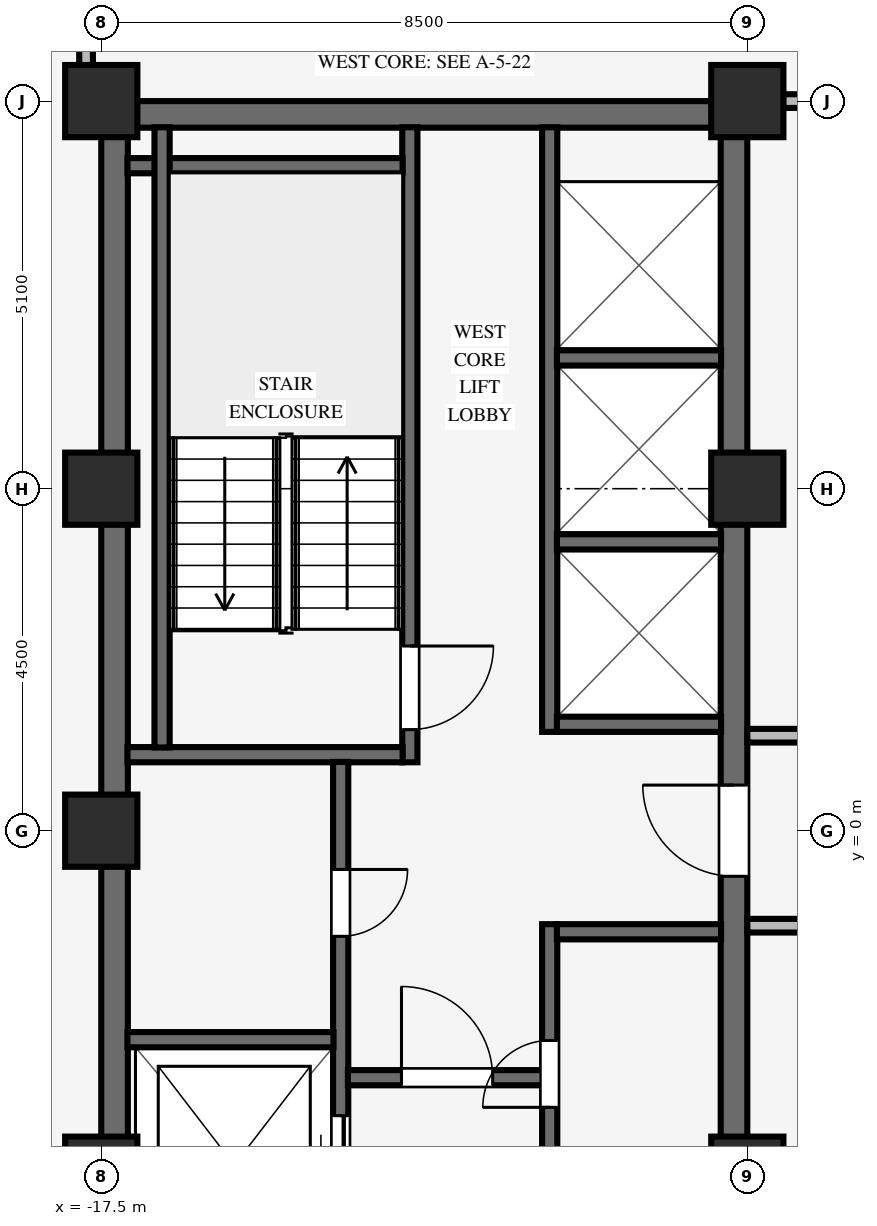
"""IFC4 building model, lengths in metres.
Left out: names, types, materials, properties, quantities, classifications, styles, units other than length and angle.
Written with IfcOpenShell. Run it as: python <this file> out.ifc"""

import sys

from ifc_helpers import new_model, si_unit, direction, frame, frame_2d, origin, origin_2d, place, context, subcontext, project, spatial, rectangle, extrude, source, transform, mapped, element, fill, save


model = new_model("IFC4")
c1 = context("Model", 3, precision=1e-05, world=origin(), true_north=direction((0.0, 1.0)))
c2 = subcontext(c1, "Body", "Model", "MODEL_VIEW")
j1 = project(units=[si_unit("LENGTHUNIT", "METRE"), si_unit("PLANEANGLEUNIT", "RADIAN")], contexts=[c1])
p1 = place(None, origin())
s1 = spatial("IfcSite", under=j1, at=p1, CompositionType="ELEMENT")
p2 = place(p1, origin())
s2 = spatial("IfcBuilding", under=s1, at=p2, CompositionType="ELEMENT")
p3 = place(p2, frame((0.0, 0.0, 220.1)))
s3 = spatial("IfcBuildingStorey", under=s2, at=p3, CompositionType="ELEMENT", Elevation=220.1)
p4 = place(p3, frame((-17.5, 9.425, 0.0), z_axis=(0.0, 0.0, 1.0), x_axis=(1.0, 0.0, 0.0)))
e1 = element("IfcWall", 1, at=p4, inside=s3, PredefinedType="SHEAR", context=c2, shape_type="SweptSolid", body=[
    extrude(rectangle(XDim=8.5, YDim=0.35, at=frame_2d((4.25, 0.0))), origin(), (0.0, 0.0, 1.0), 3.37),
])
p5 = place(p3, frame((-17.325, -9.255, 0.0), z_axis=(0.0, 0.0, 1.0), x_axis=(0.0, 1.0, 0.0)))
e2 = element("IfcWall", 2, at=p5, inside=s3, PredefinedType="SHEAR", context=c2, shape_type="SweptSolid", body=[
    extrude(rectangle(XDim=18.51, YDim=0.35, at=frame_2d((9.255, 0.0))), origin(), (0.0, 0.0, 1.0), 3.37),
])
p6 = place(p3, frame((-9.175, -9.255, 0.0), z_axis=(0.0, 0.0, 1.0), x_axis=(0.0, 1.0, 0.0)))
e3 = element("IfcWall", 3, at=p6, inside=s3, PredefinedType="SHEAR", context=c2, shape_type="SweptSolid", body=[
    extrude(rectangle(XDim=18.51, YDim=0.35, at=frame_2d((9.255, 0.0))), origin(), (0.0, 0.0, 1.0), 3.37),
])
p7 = place(p6, frame((8.655, 0.0, 0.0)))
e4 = element("IfcOpeningElement", 4, at=p7, cuts=e3, PredefinedType="OPENING", context=c2, shape_type="SweptSolid", body=[
    extrude(rectangle(XDim=1.2, YDim=2.15, at=frame_2d((0.6, 1.075))), frame((0.0, 0.185, 0.0), z_axis=(0.0, -1.0, 0.0), x_axis=(1.0, 0.0, 0.0)), (0.0, 0.0, 1.0), 0.37),
])
for number, where, z_axis, x_axis in (
    (5, (-17.5, -4.5, 0.0), (0.0, 0.0, 1.0), (1.0, 0.0, 0.0)),
    (6, (-17.5, 4.5, 0.0), (0.0, 0.0, 1.0), (1.0, 0.0, 0.0)),
    (7, (-17.5, 9.6, 0.0), (0.0, 0.0, 1.0), (1.0, 0.0, 0.0)),
    (8, (-9.0, -4.5, 0.0), (0.0, 0.0, 1.0), (1.0, 0.0, 0.0)),
    (9, (-9.0, 4.5, 0.0), (0.0, 0.0, 1.0), (1.0, 0.0, 0.0)),
    (10, (-9.0, 9.6, 0.0), (0.0, 0.0, 1.0), (1.0, 0.0, 0.0)),
    (11, (-17.5, 0.0, 0.0), (0.0, 0.0, 1.0), (1.0, 0.0, 0.0)),
):
    element("IfcColumn", number, at=place(p3, frame(where, z_axis=z_axis, x_axis=x_axis)), inside=s3, PredefinedType="COLUMN", context=c2, shape_type="SweptSolid", body=[
        extrude(rectangle(XDim=0.95, YDim=0.95, at=origin_2d()), origin(), (0.0, 0.0, 1.0), 3.37),
    ])
p8 = place(p3, frame((-13.44, 0.9, 0.0), z_axis=(0.0, 0.0, 1.0), x_axis=(0.0, 1.0, 0.0)))
e12 = element("IfcWall", 12, at=p8, inside=s3, PredefinedType="SHEAR", context=c2, shape_type="SweptSolid", body=[
    extrude(rectangle(XDim=8.355, YDim=0.2, at=frame_2d((4.177, 0.0))), origin(), (0.0, 0.0, 1.0), 3.37),
])
p9 = place(p8, frame((1.53, 0.0, 0.0), z_axis=(0.0, 0.0, 1.0), x_axis=(-1.0, 0.0, 0.0)))
e13 = element("IfcOpeningElement", 13, at=p9, cuts=e12, PredefinedType="OPENING", context=c2, shape_type="SweptSolid", body=[
    extrude(rectangle(XDim=1.1, YDim=2.15, at=frame_2d((0.55, 1.075))), frame((0.0, 0.11, 0.0), z_axis=(0.0, -1.0, 0.0), x_axis=(1.0, 0.0, 0.0)), (0.0, 0.0, 1.0), 0.22),
])
for number, where, z_axis, x_axis in (
    (14, (-17.155, 1.0, 0.0), (0.0, 0.0, 1.0), (1.0, 0.0, 0.0)),
    (15, (-17.155, 8.75, 0.0), (0.0, 0.0, 1.0), (1.0, 0.0, 0.0)),
):
    element("IfcWall", number, at=place(p3, frame(where, z_axis=z_axis, x_axis=x_axis)), inside=s3, PredefinedType="SHEAR", context=c2, shape_type="SweptSolid", body=[
        extrude(rectangle(XDim=3.62, YDim=0.2, at=frame_2d((1.81, 0.0))), origin(), (0.0, 0.0, 1.0), 3.37),
    ])
p10 = place(p3, frame((-16.7, 1.095, 0.0), z_axis=(0.0, 0.0, 1.0), x_axis=(0.0, 1.0, 0.0)))
e16 = element("IfcWall", 16, at=p10, inside=s3, PredefinedType="SHEAR", context=c2, shape_type="SweptSolid", body=[
    extrude(rectangle(XDim=8.16, YDim=0.2, at=frame_2d((4.08, 0.0))), origin(), (0.0, 0.0, 1.0), 3.37),
])
p11 = place(p3, frame((-14.35, -6.2, 0.0), z_axis=(0.0, 0.0, 1.0), x_axis=(0.0, 1.0, 0.0)))
e17 = element("IfcWall", 17, at=p11, inside=s3, PredefinedType="SHEAR", context=c2, shape_type="SweptSolid", body=[
    extrude(rectangle(XDim=7.105, YDim=0.2, at=frame_2d((3.552, 0.0))), origin(), (0.0, 0.0, 1.0), 3.37),
])
p12 = place(p11, frame((5.69, 0.0, 0.0), z_axis=(0.0, 0.0, 1.0), x_axis=(-1.0, 0.0, 0.0)))
e18 = element("IfcOpeningElement", 18, at=p12, cuts=e17, PredefinedType="OPENING", context=c2, shape_type="SweptSolid", body=[
    extrude(rectangle(XDim=0.88, YDim=2.1, at=frame_2d((0.44, 1.05))), frame((0.0, 0.11, 0.0), z_axis=(0.0, -1.0, 0.0), x_axis=(1.0, 0.0, 0.0)), (0.0, 0.0, 1.0), 0.22),
])
p13 = place(p11, frame((1.15, 0.0, 0.0)))
e19 = element("IfcOpeningElement", 19, at=p13, cuts=e17, PredefinedType="OPENING", context=c2, shape_type="SweptSolid", body=[
    extrude(rectangle(XDim=1.3, YDim=2.2, at=frame_2d((0.65, 1.1))), frame((0.0, 0.11, 0.0), z_axis=(0.0, -1.0, 0.0), x_axis=(1.0, 0.0, 0.0)), (0.0, 0.0, 1.0), 0.22),
])
p14 = place(p3, frame((-17.155, -2.75, 0.0), z_axis=(0.0, 0.0, 1.0), x_axis=(1.0, 0.0, 0.0)))
e20 = element("IfcWall", 20, at=p14, inside=s3, PredefinedType="SHEAR", context=c2, shape_type="SweptSolid", body=[
    extrude(rectangle(XDim=2.71, YDim=0.2, at=frame_2d((1.355, 0.0))), origin(), (0.0, 0.0, 1.0), 3.37),
])
p15 = place(p3, frame((-11.6, -9.255, 0.0), z_axis=(0.0, 0.0, 1.0), x_axis=(0.0, 1.0, 0.0)))
e21 = element("IfcWall", 21, at=p15, inside=s3, PredefinedType="SHEAR", context=c2, shape_type="SweptSolid", body=[
    extrude(rectangle(XDim=8.025, YDim=0.2, at=frame_2d((4.012, 0.0))), origin(), (0.0, 0.0, 1.0), 3.37),
])
p16 = place(p15, frame((5.615, 0.0, 0.0)))
e22 = element("IfcOpeningElement", 22, at=p16, cuts=e21, PredefinedType="OPENING", context=c2, shape_type="SweptSolid", body=[
    extrude(rectangle(XDim=0.88, YDim=2.1, at=frame_2d((0.44, 1.05))), frame((0.0, 0.11, 0.0), z_axis=(0.0, -1.0, 0.0), x_axis=(1.0, 0.0, 0.0)), (0.0, 0.0, 1.0), 0.22),
])
p17 = place(p3, frame((-14.255, -3.25, 0.0), z_axis=(0.0, 0.0, 1.0), x_axis=(1.0, 0.0, 0.0)))
e23 = element("IfcWall", 23, at=p17, inside=s3, PredefinedType="SHEAR", context=c2, shape_type="SweptSolid", body=[
    extrude(rectangle(XDim=2.56, YDim=0.2, at=frame_2d((1.28, 0.0))), origin(), (0.0, 0.0, 1.0), 3.37),
])
p18 = place(p17, frame((0.705, 0.0, 0.0)))
e24 = element("IfcOpeningElement", 24, at=p18, cuts=e23, PredefinedType="OPENING", context=c2, shape_type="SweptSolid", body=[
    extrude(rectangle(XDim=1.2, YDim=2.15, at=frame_2d((0.6, 1.075))), frame((0.0, 0.11, 0.0), z_axis=(0.0, -1.0, 0.0), x_axis=(1.0, 0.0, 0.0)), (0.0, 0.0, 1.0), 0.22),
])
p19 = place(p3, frame((-11.505, -1.33, 0.0), z_axis=(0.0, 0.0, 1.0), x_axis=(1.0, 0.0, 0.0)))
e25 = element("IfcWall", 25, at=p19, inside=s3, PredefinedType="SHEAR", context=c2, shape_type="SweptSolid", body=[
    extrude(rectangle(XDim=2.16, YDim=0.2, at=frame_2d((1.08, 0.0))), origin(), (0.0, 0.0, 1.0), 3.37),
])
p20 = place(p3, frame((-11.6, 1.3, 0.0), z_axis=(0.0, 0.0, 1.0), x_axis=(0.0, 1.0, 0.0)))
e26 = element("IfcWall", 26, at=p20, inside=s3, PredefinedType="SHEAR", context=c2, shape_type="SweptSolid", body=[
    extrude(rectangle(XDim=7.955, YDim=0.2, at=frame_2d((3.978, 0.0))), origin(), (0.0, 0.0, 1.0), 3.37),
])
for number, where, z_axis, x_axis in (
    (27, (-11.505, 1.4, 0.0), (0.0, 0.0, 1.0), (1.0, 0.0, 0.0)),
    (28, (-11.505, 3.8, 0.0), (0.0, 0.0, 1.0), (1.0, 0.0, 0.0)),
    (29, (-11.505, 6.22, 0.0), (0.0, 0.0, 1.0), (1.0, 0.0, 0.0)),
):
    element("IfcWall", number, at=place(p3, frame(where, z_axis=z_axis, x_axis=x_axis)), inside=s3, PredefinedType="SHEAR", context=c2, shape_type="SweptSolid", body=[
        extrude(rectangle(XDim=2.16, YDim=0.2, at=frame_2d((1.08, 0.0))), origin(), (0.0, 0.0, 1.0), 3.37),
    ])
p21 = place(p3, frame((-9.0, -1.25, 0.0), z_axis=(0.0, 0.0, 1.0), x_axis=(1.0, 0.0, 0.0)))
e30 = element("IfcWall", 30, at=p21, inside=s3, PredefinedType="PARTITIONING", context=c2, shape_type="SweptSolid", body=[
    extrude(rectangle(XDim=15.6, YDim=0.18, at=frame_2d((7.8, 0.0))), origin(), (0.0, 0.0, 1.0), 3.36),
])
p22 = place(p21, frame((10.97, 0.0, 0.0)))
e31 = element("IfcOpeningElement", 31, at=p22, cuts=e30, PredefinedType="OPENING", context=c2, shape_type="SweptSolid", body=[
    extrude(rectangle(XDim=0.96, YDim=2.1, at=frame_2d((0.48, 1.05))), frame((0.0, 0.1, 0.0), z_axis=(0.0, -1.0, 0.0), x_axis=(1.0, 0.0, 0.0)), (0.0, 0.0, 1.0), 0.2),
])
p23 = place(p21, frame((3.17, 0.0, 0.0)))
e32 = element("IfcOpeningElement", 32, at=p23, cuts=e30, PredefinedType="OPENING", context=c2, shape_type="SweptSolid", body=[
    extrude(rectangle(XDim=0.96, YDim=2.1, at=frame_2d((0.48, 1.05))), frame((0.0, 0.1, 0.0), z_axis=(0.0, -1.0, 0.0), x_axis=(1.0, 0.0, 0.0)), (0.0, 0.0, 1.0), 0.2),
])
p24 = place(p3, frame((-9.0, 1.25, 0.0), z_axis=(0.0, 0.0, 1.0), x_axis=(1.0, 0.0, 0.0)))
e33 = element("IfcWall", 33, at=p24, inside=s3, PredefinedType="PARTITIONING", context=c2, shape_type="SweptSolid", body=[
    extrude(rectangle(XDim=15.6, YDim=0.18, at=frame_2d((7.8, 0.0))), origin(), (0.0, 0.0, 1.0), 3.36),
])
p25 = place(p24, frame((4.87, 0.0, 0.0)))
e34 = element("IfcOpeningElement", 34, at=p25, cuts=e33, PredefinedType="OPENING", context=c2, shape_type="SweptSolid", body=[
    extrude(rectangle(XDim=0.96, YDim=2.1, at=frame_2d((0.48, 1.05))), frame((0.0, 0.1, 0.0), z_axis=(0.0, -1.0, 0.0), x_axis=(1.0, 0.0, 0.0)), (0.0, 0.0, 1.0), 0.2),
])
p26 = place(p3, frame((-8.529, 9.6, 0.0), z_axis=(0.0, 0.0, 1.0), x_axis=(1.0, 0.0, 0.0)))
e35 = element("IfcWall", 35, at=p26, inside=s3, PredefinedType="PARTITIONING", context=c2, shape_type="SweptSolid", body=[
    extrude(rectangle(XDim=8.378, YDim=0.18, at=frame_2d((4.189, 0.0))), origin(), (0.0, 0.0, 1.0), 2.405),
])
p27 = place(p3, frame((-17.7, 10.071, 0.0), z_axis=(0.0, 0.0, 1.0), x_axis=(0.0, 1.0, 0.0)))
e36 = element("IfcWall", 36, at=p27, inside=s3, PredefinedType="PARTITIONING", context=c2, shape_type="SweptSolid", body=[
    extrude(rectangle(XDim=3.343, YDim=0.18, at=frame_2d((1.671, 0.0))), origin(), (0.0, 0.0, 1.0), 2.816),
])
m1 = source(origin(), c2, "Body", "SweptSolid", [
    extrude(rectangle(XDim=1.1, YDim=2.15, at=frame_2d((0.55, 1.075))), frame((0.0, 0.025, 0.0), z_axis=(0.0, -1.0, 0.0), x_axis=(1.0, 0.0, 0.0)), (0.0, 0.0, 1.0), 0.05),
])
p28 = place(p9, origin())
e37 = element("IfcDoor", 37, at=p28, inside=s3, OperationType="SINGLE_SWING_LEFT", PredefinedType="DOOR", context=c2, shape_type="MappedRepresentation", body=[
    mapped(m1, transform((0.0, 0.0, 0.0), scale=1.0)),
])
fill(e13, e37)
m2 = source(origin(), c2, "Body", "SweptSolid", [
    extrude(rectangle(XDim=0.88, YDim=2.1, at=frame_2d((0.44, 1.05))), frame((0.0, 0.025, 0.0), z_axis=(0.0, -1.0, 0.0), x_axis=(1.0, 0.0, 0.0)), (0.0, 0.0, 1.0), 0.05),
])
p29 = place(p12, origin())
e38 = element("IfcDoor", 38, at=p29, inside=s3, OperationType="SINGLE_SWING_LEFT", PredefinedType="DOOR", context=c2, shape_type="MappedRepresentation", body=[
    mapped(m2, transform((0.0, 0.0, 0.0), scale=1.0)),
])
fill(e18, e38)
m3 = source(origin(), c2, "Body", "SweptSolid", [
    extrude(rectangle(XDim=1.2, YDim=2.15, at=frame_2d((0.6, 1.075))), frame((0.0, 0.025, 0.0), z_axis=(0.0, -1.0, 0.0), x_axis=(1.0, 0.0, 0.0)), (0.0, 0.0, 1.0), 0.05),
])
p30 = place(p18, origin())
e39 = element("IfcDoor", 39, at=p30, inside=s3, OperationType="SINGLE_SWING_LEFT", PredefinedType="DOOR", context=c2, shape_type="MappedRepresentation", body=[
    mapped(m3, transform((0.0, 0.0, 0.0), scale=1.0)),
])
fill(e24, e39)
p31 = place(p16, origin())
e40 = element("IfcDoor", 40, at=p31, inside=s3, OperationType="SINGLE_SWING_LEFT", PredefinedType="DOOR", context=c2, shape_type="MappedRepresentation", body=[
    mapped(m2, transform((0.0, 0.0, 0.0), scale=1.0)),
])
fill(e22, e40)
p32 = place(p7, origin())
e41 = element("IfcDoor", 41, at=p32, inside=s3, OperationType="SINGLE_SWING_RIGHT", PredefinedType="DOOR", context=c2, shape_type="MappedRepresentation", body=[
    mapped(m3, transform((0.0, 0.0, 0.0), scale=1.0)),
])
fill(e4, e41)
m4 = source(origin(), c2, "Body", "SweptSolid", [
    extrude(rectangle(XDim=1.3, YDim=2.2, at=frame_2d((0.65, 1.1))), frame((0.0, 0.025, 0.0), z_axis=(0.0, -1.0, 0.0), x_axis=(1.0, 0.0, 0.0)), (0.0, 0.0, 1.0), 0.05),
])
p33 = place(p13, origin())
e42 = element("IfcDoor", 42, at=p33, inside=s3, OperationType="DOUBLE_DOOR_SLIDING", PredefinedType="DOOR", context=c2, shape_type="MappedRepresentation", body=[
    mapped(m4, transform((0.0, 0.0, 0.0), scale=1.0)),
])
fill(e19, e42)
save(model, sys.argv[1])
